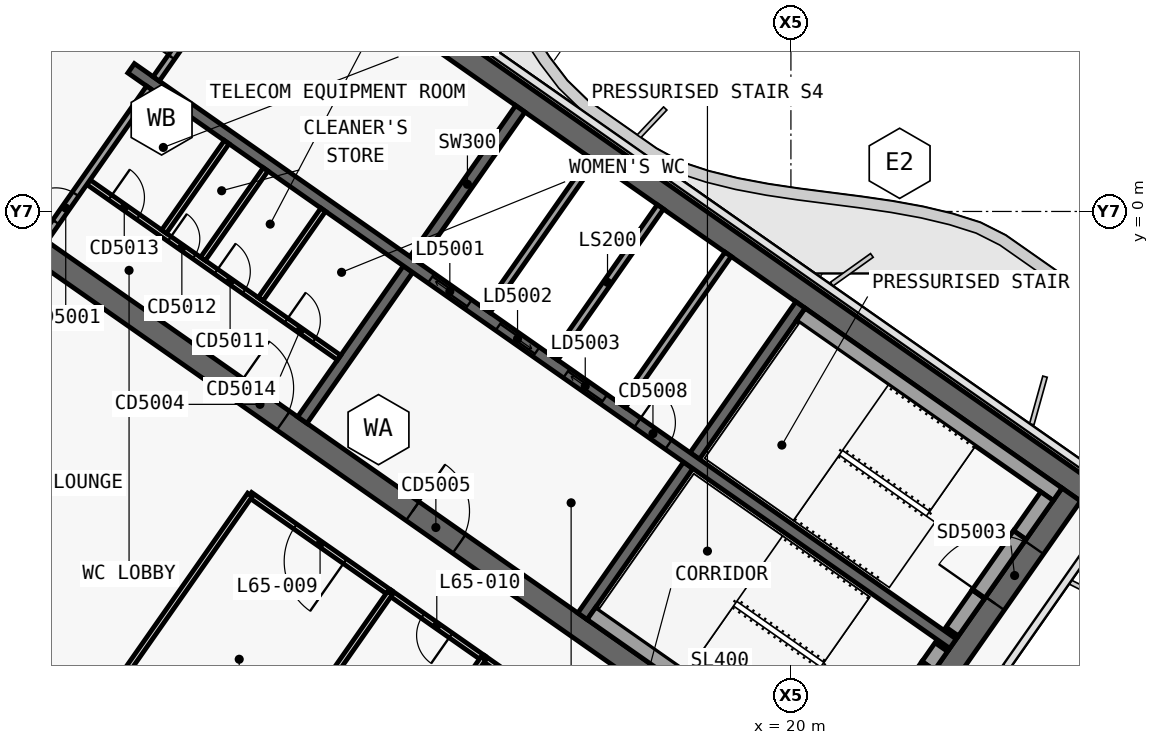
"""IFC4 building model, lengths in metres.
Left out: names, types, materials, properties, quantities, classifications, styles, units other than length and angle.
Written with IfcOpenShell. Run it as: python <this file> out.ifc"""

import sys

from ifc_helpers import new_model, si_unit, direction, frame, frame_2d, origin, place, context, subcontext, project, spatial, polyline, rectangle, outline, extrude, element, fill, save


model = new_model("IFC4")
c1 = context("Model", 3, precision=1e-05, world=origin(), true_north=direction((0.0, 1.0)))
c2 = subcontext(c1, "Body", "Model", "MODEL_VIEW")
j1 = project(units=[si_unit("LENGTHUNIT", "METRE"), si_unit("PLANEANGLEUNIT", "RADIAN")], contexts=[c1])
p1 = place(None, origin())
s1 = spatial("IfcSite", under=j1, at=p1, CompositionType="ELEMENT")
p2 = place(p1, origin())
s2 = spatial("IfcBuilding", under=s1, at=p2, CompositionType="ELEMENT")
p3 = place(p2, frame((0.0, 0.0, 276.1)))
s3 = spatial("IfcBuildingStorey", under=s2, at=p3, CompositionType="ELEMENT", Elevation=276.1)
p4 = place(p3, frame((0.028, 12.066, 0.0), z_axis=(0.0, 0.0, 1.0), x_axis=(0.819151382952, -0.573577380837, 0.0)))
e1 = element("IfcWall", 1, at=p4, inside=s3, PredefinedType="SHEAR", context=c2, shape_type="SweptSolid", body=[
    extrude(outline(polyline([(33.898, 0.3), (0.0, 0.3), (0.42, -0.3), (33.898, -0.3), (33.898, 0.3)])), origin(), (0.0, 0.0, 1.0), 3.9),
])
p5 = place(p3, frame((0.028, -0.874, 0.0), z_axis=(0.0, 0.0, 1.0), x_axis=(0.819150035022, -0.573579305871, 0.0)))
e2 = element("IfcWall", 2, at=p5, inside=s3, PredefinedType="SHEAR", context=c2, shape_type="SweptSolid", body=[
    extrude(outline(polyline([(26.476, 0.3), (0.0, 0.3), (0.42, -0.3), (26.476, -0.3), (26.476, 0.3)])), origin(), (0.0, 0.0, 1.0), 3.9),
])
p6 = place(p5, frame((6.576, 0.0, 0.0)))
e3 = element("IfcOpeningElement", 3, at=p6, cuts=e2, PredefinedType="OPENING", context=c2, shape_type="SweptSolid", body=[
    extrude(rectangle(XDim=1.5, YDim=2.1, at=frame_2d((0.75, 1.05))), frame((0.0, 0.31, 0.0), z_axis=(0.0, -1.0, 0.0), x_axis=(1.0, 0.0, 0.0)), (0.0, 0.0, 1.0), 0.62),
])
p7 = place(p5, frame((12.226, 0.0, 0.0)))
e4 = element("IfcOpeningElement", 4, at=p7, cuts=e2, PredefinedType="OPENING", context=c2, shape_type="SweptSolid", body=[
    extrude(rectangle(XDim=1.5, YDim=2.1, at=frame_2d((0.75, 1.05))), frame((0.0, 0.31, 0.0), z_axis=(0.0, -1.0, 0.0), x_axis=(1.0, 0.0, 0.0)), (0.0, 0.0, 1.0), 0.62),
])
p8 = place(p3, frame((21.642, -15.642, 0.0), z_axis=(0.0, 0.0, 1.0), x_axis=(0.573586866468, 0.819144740944, 0.0)))
e5 = element("IfcWall", 5, at=p8, inside=s3, PredefinedType="SHEAR", context=c2, shape_type="SweptSolid", body=[
    extrude(outline(polyline([(10.0, 0.3), (0.0, 0.3), (0.0, -0.3), (10.0, -0.3), (10.0, 0.3)])), origin(), (0.0, 0.0, 1.0), 3.9),
])
p9 = place(p8, frame((6.5, 0.0, 0.0)))
e6 = element("IfcOpeningElement", 6, at=p9, cuts=e5, PredefinedType="OPENING", context=c2, shape_type="SweptSolid", body=[
    extrude(rectangle(XDim=1.8, YDim=2.1, at=frame_2d((0.9, 1.05))), frame((0.0, 0.31, 0.0), z_axis=(0.0, -1.0, 0.0), x_axis=(1.0, 0.0, 0.0)), (0.0, 0.0, 1.0), 0.62),
])
p10 = place(p8, frame((2.3, 0.0, 0.0)))
e7 = element("IfcOpeningElement", 7, at=p10, cuts=e5, PredefinedType="OPENING", context=c2, shape_type="SweptSolid", body=[
    extrude(rectangle(XDim=1.8, YDim=2.1, at=frame_2d((0.9, 1.05))), frame((0.0, 0.31, 0.0), z_axis=(0.0, -1.0, 0.0), x_axis=(1.0, 0.0, 0.0)), (0.0, 0.0, 1.0), 0.62),
])
p11 = place(p3, frame((7.143, -5.49, 0.0), z_axis=(0.0, 0.0, 1.0), x_axis=(0.573617744349, 0.819123118565, 0.0)))
e8 = element("IfcWall", 8, at=p11, inside=s3, PredefinedType="SHEAR", context=c2, shape_type="SweptSolid", body=[
    extrude(outline(polyline([(0.0, 0.15), (0.0, -0.15), (4.85, -0.15), (4.85, 0.15), (0.0, 0.15)])), origin(), (0.0, 0.0, 1.0), 3.9),
])
p12 = place(p3, frame((10.097, -1.271, 0.0), z_axis=(0.0, 0.0, 1.0), x_axis=(0.573560315113, 0.819163332265, 0.0)))
e9 = element("IfcWall", 9, at=p12, inside=s3, PredefinedType="SHEAR", context=c2, shape_type="SweptSolid", body=[
    extrude(outline(polyline([(4.85, -0.15), (4.85, 0.15), (0.0, 0.15), (0.0, -0.15), (4.85, -0.15)])), origin(), (0.0, 0.0, 1.0), 3.9),
])
p13 = place(p3, frame((14.515, -10.652, 0.0), z_axis=(0.0, 0.0, 1.0), x_axis=(0.573560315113, 0.819163332265, 0.0)))
e10 = element("IfcWall", 10, at=p13, inside=s3, PredefinedType="SHEAR", context=c2, shape_type="SweptSolid", body=[
    extrude(outline(polyline([(0.0, 0.15), (0.0, -0.15), (4.85, -0.15), (4.85, 0.15), (0.0, 0.15)])), origin(), (0.0, 0.0, 1.0), 3.9),
])
p14 = place(p3, frame((17.469, -6.433, 0.0), z_axis=(0.0, 0.0, 1.0), x_axis=(0.573594092424, 0.81913968109, 0.0)))
e11 = element("IfcWall", 11, at=p14, inside=s3, PredefinedType="SHEAR", context=c2, shape_type="SweptSolid", body=[
    extrude(outline(polyline([(4.85, -0.15), (4.85, 0.15), (0.0, 0.15), (0.0, -0.15), (4.85, -0.15)])), origin(), (0.0, 0.0, 1.0), 3.9),
])
p15 = place(p3, frame((2.638, 3.768, 0.0), z_axis=(0.0, 0.0, 1.0), x_axis=(0.819155014212, -0.573572194837, 0.0)))
e12 = element("IfcWall", 12, at=p15, inside=s3, PredefinedType="SHEAR", context=c2, shape_type="SweptSolid", body=[
    extrude(outline(polyline([(0.0, 0.15), (0.0, -0.15), (26.4, -0.15), (26.4, 0.15), (0.0, 0.15)])), origin(), (0.0, 0.0, 1.0), 3.9),
])
p16 = place(p15, frame((9.637, 0.0, 0.0)))
e13 = element("IfcOpeningElement", 13, at=p16, cuts=e12, PredefinedType="OPENING", context=c2, shape_type="SweptSolid", body=[
    extrude(rectangle(XDim=1.2, YDim=2.1, at=frame_2d((0.6, 1.05))), frame((0.0, 0.16, 0.0), z_axis=(0.0, -1.0, 0.0), x_axis=(1.0, 0.0, 0.0)), (0.0, 0.0, 1.0), 0.32),
])
p17 = place(p15, frame((11.812, 0.0, 0.0)))
e14 = element("IfcOpeningElement", 14, at=p17, cuts=e12, PredefinedType="OPENING", context=c2, shape_type="SweptSolid", body=[
    extrude(rectangle(XDim=1.2, YDim=2.1, at=frame_2d((0.6, 1.05))), frame((0.0, 0.16, 0.0), z_axis=(0.0, -1.0, 0.0), x_axis=(1.0, 0.0, 0.0)), (0.0, 0.0, 1.0), 0.32),
])
p18 = place(p15, frame((13.988, 0.0, 0.0)))
e15 = element("IfcOpeningElement", 15, at=p18, cuts=e12, PredefinedType="OPENING", context=c2, shape_type="SweptSolid", body=[
    extrude(rectangle(XDim=1.2, YDim=2.1, at=frame_2d((0.6, 1.05))), frame((0.0, 0.16, 0.0), z_axis=(0.0, -1.0, 0.0), x_axis=(1.0, 0.0, 0.0)), (0.0, 0.0, 1.0), 0.32),
])
p19 = place(p15, frame((16.262, 0.0, 0.0)))
e16 = element("IfcOpeningElement", 16, at=p19, cuts=e12, PredefinedType="OPENING", context=c2, shape_type="SweptSolid", body=[
    extrude(rectangle(XDim=1.0, YDim=2.1, at=frame_2d((0.5, 1.05))), frame((0.0, 0.16, 0.0), z_axis=(0.0, -1.0, 0.0), x_axis=(1.0, 0.0, 0.0)), (0.0, 0.0, 1.0), 0.32),
])
p20 = place(p3, frame((12.001, -2.605, 0.0), z_axis=(0.0, 0.0, 1.0), x_axis=(0.573560315113, 0.819163332265, 0.0)))
e17 = element("IfcWall", 17, at=p20, inside=s3, PredefinedType="SOLIDWALL", context=c2, shape_type="SweptSolid", body=[
    extrude(rectangle(XDim=4.85, YDim=0.2, at=frame_2d((2.425, 0.0))), origin(), (0.0, 0.0, 1.0), 3.9),
])
p21 = place(p3, frame((13.783, -3.852, 0.0), z_axis=(0.0, 0.0, 1.0), x_axis=(0.573594092424, 0.81913968109, 0.0)))
e18 = element("IfcWall", 18, at=p21, inside=s3, PredefinedType="SOLIDWALL", context=c2, shape_type="SweptSolid", body=[
    extrude(rectangle(XDim=4.85, YDim=0.2, at=frame_2d((2.425, 0.0))), origin(), (0.0, 0.0, 1.0), 3.9),
])
p22 = place(p3, frame((15.565, -5.1, 0.0), z_axis=(0.0, 0.0, 1.0), x_axis=(0.573560315113, 0.819163332265, 0.0)))
e19 = element("IfcWall", 19, at=p22, inside=s3, PredefinedType="SOLIDWALL", context=c2, shape_type="SweptSolid", body=[
    extrude(rectangle(XDim=4.85, YDim=0.2, at=frame_2d((2.425, 0.0))), origin(), (0.0, 0.0, 1.0), 3.9),
])
p23 = place(p3, frame((1.516, 0.77, 0.0), z_axis=(0.0, 0.0, 1.0), x_axis=(0.819146424436, -0.573584462249, 0.0)))
e20 = element("IfcWall", 20, at=p23, inside=s3, PredefinedType="PARTITIONING", context=c2, shape_type="SweptSolid", body=[
    extrude(rectangle(XDim=8.05, YDim=0.15, at=frame_2d((4.025, 0.0))), origin(), (0.0, 0.0, 1.0), 3.62),
])
p24 = place(p23, frame((0.7, 0.0, 0.0)))
e21 = element("IfcOpeningElement", 21, at=p24, cuts=e20, PredefinedType="OPENING", context=c2, shape_type="SweptSolid", body=[
    extrude(rectangle(XDim=0.9, YDim=2.1, at=frame_2d((0.45, 1.05))), frame((0.0, 0.085, 0.0), z_axis=(0.0, -1.0, 0.0), x_axis=(1.0, 0.0, 0.0)), (0.0, 0.0, 1.0), 0.17),
])
p25 = place(p23, frame((2.6, 0.0, 0.0)))
e22 = element("IfcOpeningElement", 22, at=p25, cuts=e20, PredefinedType="OPENING", context=c2, shape_type="SweptSolid", body=[
    extrude(rectangle(XDim=0.8, YDim=2.1, at=frame_2d((0.4, 1.05))), frame((0.0, 0.085, 0.0), z_axis=(0.0, -1.0, 0.0), x_axis=(1.0, 0.0, 0.0)), (0.0, 0.0, 1.0), 0.17),
])
p26 = place(p23, frame((4.1, 0.0, 0.0)))
e23 = element("IfcOpeningElement", 23, at=p26, cuts=e20, PredefinedType="OPENING", context=c2, shape_type="SweptSolid", body=[
    extrude(rectangle(XDim=0.9, YDim=2.1, at=frame_2d((0.45, 1.05))), frame((0.0, 0.085, 0.0), z_axis=(0.0, -1.0, 0.0), x_axis=(1.0, 0.0, 0.0)), (0.0, 0.0, 1.0), 0.17),
])
p27 = place(p23, frame((6.35, 0.0, 0.0)))
e24 = element("IfcOpeningElement", 24, at=p27, cuts=e20, PredefinedType="OPENING", context=c2, shape_type="SweptSolid", body=[
    extrude(rectangle(XDim=0.9, YDim=2.1, at=frame_2d((0.45, 1.05))), frame((0.0, 0.085, 0.0), z_axis=(0.0, -1.0, 0.0), x_axis=(1.0, 0.0, 0.0)), (0.0, 0.0, 1.0), 0.17),
])
p28 = place(p3, frame((3.504, -0.531, 0.0), z_axis=(0.0, 0.0, 1.0), x_axis=(0.573582013179, 0.819148139324, 0.0)))
e25 = element("IfcWall", 25, at=p28, inside=s3, PredefinedType="PARTITIONING", context=c2, shape_type="SweptSolid", body=[
    extrude(rectangle(XDim=2.875, YDim=0.15, at=frame_2d((1.438, 0.0))), origin(), (0.0, 0.0, 1.0), 3.62),
])
p29 = place(p3, frame((4.528, -1.248, 0.0), z_axis=(0.0, 0.0, 1.0), x_axis=(0.573621911162, 0.819120200602, 0.0)))
e26 = element("IfcWall", 26, at=p29, inside=s3, PredefinedType="PARTITIONING", context=c2, shape_type="SweptSolid", body=[
    extrude(rectangle(XDim=2.875, YDim=0.15, at=frame_2d((1.438, 0.0))), origin(), (0.0, 0.0, 1.0), 3.62),
])
p30 = place(p3, frame((6.044, -2.309, 0.0), z_axis=(0.0, 0.0, 1.0), x_axis=(0.573564930514, 0.819160100642, 0.0)))
e27 = element("IfcWall", 27, at=p30, inside=s3, PredefinedType="PARTITIONING", context=c2, shape_type="SweptSolid", body=[
    extrude(rectangle(XDim=2.875, YDim=0.15, at=frame_2d((1.438, 0.0))), origin(), (0.0, 0.0, 1.0), 3.62),
])
p31 = place(p3, frame((20.259, -2.71, 0.0), z_axis=(0.0, 0.0, 1.0), x_axis=(0.81914849389, -0.573581506813, 0.0)))
e28 = element("IfcWall", 28, at=p31, inside=s3, PredefinedType="SOLIDWALL", context=c2, shape_type="SweptSolid", body=[
    extrude(rectangle(XDim=8.25, YDim=0.4, at=frame_2d((4.125, 0.0))), origin(), (0.0, 0.0, 1.0), 3.62),
])
p32 = place(p3, frame((24.244, -11.055, 0.0), z_axis=(0.0, 0.0, 1.0), x_axis=(0.573571582932, 0.819155442668, 0.0)))
e29 = element("IfcWall", 29, at=p32, inside=s3, PredefinedType="SOLIDWALL", context=c2, shape_type="SweptSolid", body=[
    extrude(rectangle(XDim=1.2, YDim=0.4, at=frame_2d((0.6, 0.0))), origin(), (0.0, 0.0, 1.0), 3.62),
])
p33 = place(p3, frame((26.022, -8.515, 0.0), z_axis=(0.0, 0.0, 1.0), x_axis=(0.573619628835, 0.819121798889, 0.0)))
e30 = element("IfcWall", 30, at=p33, inside=s3, PredefinedType="SOLIDWALL", context=c2, shape_type="SweptSolid", body=[
    extrude(rectangle(XDim=1.25, YDim=0.4, at=frame_2d((0.625, 0.0))), origin(), (0.0, 0.0, 1.0), 3.62),
])
p34 = place(p3, frame((24.932, -10.072, 2.15), z_axis=(0.0, 0.0, 1.0), x_axis=(0.573591692345, 0.819141361715, 0.0)))
e31 = element("IfcWall", 31, at=p34, inside=s3, PredefinedType="SOLIDWALL", context=c2, shape_type="SweptSolid", body=[
    extrude(rectangle(XDim=1.9, YDim=0.4, at=frame_2d((0.95, 0.0))), origin(), (0.0, 0.0, 1.0), 1.47),
])
p35 = place(p3, frame((14.753, -10.574, 0.0), z_axis=(0.0, 0.0, 1.0), x_axis=(0.819158229677, -0.573567602601, 0.0)))
e32 = element("IfcWall", 32, at=p35, inside=s3, PredefinedType="SOLIDWALL", context=c2, shape_type="SweptSolid", body=[
    extrude(rectangle(XDim=8.25, YDim=0.4, at=frame_2d((4.125, 0.0))), origin(), (0.0, 0.0, 1.0), 3.62),
])
p36 = place(p3, frame((23.613, -11.956, 0.0), z_axis=(0.0, 0.0, 1.0), x_axis=(0.573435029941, 0.819251039936, 0.0)))
e33 = element("IfcWall", 33, at=p36, inside=s3, PredefinedType="SOLIDWALL", context=c2, shape_type="SweptSolid", body=[
    extrude(rectangle(XDim=0.6, YDim=0.4, at=frame_2d((0.3, 0.0))), origin(), (0.0, 0.0, 1.0), 3.62),
])
p37 = place(p3, frame((22.523, -13.512, 2.15), z_axis=(0.0, 0.0, 1.0), x_axis=(0.573591692345, 0.819141361715, 0.0)))
e34 = element("IfcWall", 34, at=p37, inside=s3, PredefinedType="SOLIDWALL", context=c2, shape_type="SweptSolid", body=[
    extrude(rectangle(XDim=1.9, YDim=0.4, at=frame_2d((0.95, 0.0))), origin(), (0.0, 0.0, 1.0), 1.47),
])
p38 = place(p3, frame((0.344, -0.729, 0.0), z_axis=(0.0, 0.0, 1.0), x_axis=(0.573560315113, 0.819163332265, 0.0)))
e35 = element("IfcWall", 35, at=p38, inside=s3, PredefinedType="SOLIDWALL", context=c2, shape_type="SweptSolid", body=[
    extrude(rectangle(XDim=4.85, YDim=0.2, at=frame_2d((2.425, 0.0))), origin(), (0.0, 0.0, 1.0), 3.62),
])
p39 = place(p38, frame((0.55, 0.0, 0.0)))
e36 = element("IfcOpeningElement", 36, at=p39, cuts=e35, PredefinedType="OPENING", context=c2, shape_type="SweptSolid", body=[
    extrude(rectangle(XDim=0.9, YDim=2.1, at=frame_2d((0.45, 1.05))), frame((0.0, 0.11, 0.0), z_axis=(0.0, -1.0, 0.0), x_axis=(1.0, 0.0, 0.0)), (0.0, 0.0, 1.0), 0.22),
])
p40 = place(p3, frame((3.298, 3.49, 0.0), z_axis=(0.0, 0.0, 1.0), x_axis=(0.573560315113, 0.819163332265, 0.0)))
e37 = element("IfcWall", 37, at=p40, inside=s3, PredefinedType="SOLIDWALL", context=c2, shape_type="SweptSolid", body=[
    extrude(rectangle(XDim=4.85, YDim=0.2, at=frame_2d((2.425, 0.0))), origin(), (0.0, 0.0, 1.0), 3.62),
])
p41 = place(p40, frame((0.7, 0.0, 0.0)))
e38 = element("IfcOpeningElement", 38, at=p41, cuts=e37, PredefinedType="OPENING", context=c2, shape_type="SweptSolid", body=[
    extrude(rectangle(XDim=1.0, YDim=2.1, at=frame_2d((0.5, 1.05))), frame((0.0, 0.11, 0.0), z_axis=(0.0, -1.0, 0.0), x_axis=(1.0, 0.0, 0.0)), (0.0, 0.0, 1.0), 0.22),
])
p42 = place(p3, frame((9.454, -10.038, 0.0), z_axis=(0.0, 0.0, 1.0), x_axis=(-0.819142740634, 0.573589723117, 0.0)))
e39 = element("IfcWall", 39, at=p42, inside=s3, PredefinedType="PARTITIONING", context=c2, shape_type="SweptSolid", body=[
    extrude(rectangle(XDim=4.502, YDim=0.15, at=frame_2d((2.251, 0.0))), origin(), (0.0, 0.0, 1.0), 3.05),
])
p43 = place(p42, frame((1.451, 0.0, 0.0)))
e40 = element("IfcOpeningElement", 40, at=p43, cuts=e39, PredefinedType="OPENING", context=c2, shape_type="SweptSolid", body=[
    extrude(rectangle(XDim=1.6, YDim=2.1, at=frame_2d((0.8, 1.05))), frame((0.0, 0.085, 0.0), z_axis=(0.0, -1.0, 0.0), x_axis=(1.0, 0.0, 0.0)), (0.0, 0.0, 1.0), 0.17),
])
p44 = place(p3, frame((11.912, -11.759, 0.0), z_axis=(0.0, 0.0, 1.0), x_axis=(-0.81916700466, 0.573555070134, 0.0)))
e41 = element("IfcWall", 41, at=p44, inside=s3, PredefinedType="PARTITIONING", context=c2, shape_type="SweptSolid", body=[
    extrude(rectangle(XDim=3.004, YDim=0.15, at=frame_2d((1.502, 0.0))), origin(), (0.0, 0.0, 1.0), 3.62),
])
p45 = place(p44, frame((1.052, 0.0, 0.0)))
e42 = element("IfcOpeningElement", 42, at=p45, cuts=e41, PredefinedType="OPENING", context=c2, shape_type="SweptSolid", body=[
    extrude(rectangle(XDim=0.9, YDim=2.1, at=frame_2d((0.45, 1.05))), frame((0.0, 0.085, 0.0), z_axis=(0.0, -1.0, 0.0), x_axis=(1.0, 0.0, 0.0)), (0.0, 0.0, 1.0), 0.17),
])
p46 = place(p3, frame((14.369, -13.479, 0.0), z_axis=(0.0, 0.0, 1.0), x_axis=(-0.81916700466, 0.573555070134, 0.0)))
e43 = element("IfcWall", 43, at=p46, inside=s3, PredefinedType="PARTITIONING", context=c2, shape_type="SweptSolid", body=[
    extrude(rectangle(XDim=3.004, YDim=0.15, at=frame_2d((1.502, 0.0))), origin(), (0.0, 0.0, 1.0), 3.05),
])
p47 = place(p46, frame((1.052, 0.0, 0.0)))
e44 = element("IfcOpeningElement", 44, at=p47, cuts=e43, PredefinedType="OPENING", context=c2, shape_type="SweptSolid", body=[
    extrude(rectangle(XDim=0.9, YDim=2.1, at=frame_2d((0.45, 1.05))), frame((0.0, 0.085, 0.0), z_axis=(0.0, -1.0, 0.0), x_axis=(1.0, 0.0, 0.0)), (0.0, 0.0, 1.0), 0.17),
])
p48 = place(p3, frame((9.452, -10.037, 0.0), z_axis=(0.0, 0.0, 1.0), x_axis=(-0.573575945067, -0.81915238829, 0.0)))
e45 = element("IfcWall", 45, at=p48, inside=s3, PredefinedType="PARTITIONING", context=c2, shape_type="SweptSolid", body=[
    extrude(rectangle(XDim=7.5, YDim=0.15, at=frame_2d((3.75, 0.0))), origin(), (0.0, 0.0, 1.0), 3.0),
])
p49 = place(p3, frame((1.849, -13.051, 0.0), z_axis=(0.0, 0.0, 1.0), x_axis=(0.573577493031, 0.819151304393, 0.0)))
e46 = element("IfcWall", 46, at=p49, inside=s3, PredefinedType="PARTITIONING", context=c2, shape_type="SweptSolid", body=[
    extrude(rectangle(XDim=6.83, YDim=0.15, at=frame_2d((3.415, 0.0))), origin(), (0.0, 0.0, 1.0), 3.05),
])
p50 = place(p3, frame((11.91, -11.758, 0.0), z_axis=(0.0, 0.0, 1.0), x_axis=(-0.573560650686, -0.819163097304, 0.0)))
e47 = element("IfcWall", 47, at=p50, inside=s3, PredefinedType="PARTITIONING", context=c2, shape_type="SweptSolid", body=[
    extrude(rectangle(XDim=7.5, YDim=0.15, at=frame_2d((3.75, 0.0))), origin(), (0.0, 0.0, 1.0), 3.0),
])
p51 = place(p16, origin())
e48 = element("IfcDoor", 48, at=p51, inside=s3, OperationType="SLIDING_TO_LEFT", PredefinedType="DOOR", context=c2, shape_type="SweptSolid", body=[
    extrude(rectangle(XDim=1.2, YDim=2.1, at=frame_2d((0.6, 1.05))), frame((0.0, 0.025, 0.0), z_axis=(0.0, -1.0, 0.0), x_axis=(1.0, 0.0, 0.0)), (0.0, 0.0, 1.0), 0.05),
])
fill(e13, e48)
p52 = place(p17, origin())
e49 = element("IfcDoor", 49, at=p52, inside=s3, OperationType="SLIDING_TO_RIGHT", PredefinedType="DOOR", context=c2, shape_type="SweptSolid", body=[
    extrude(rectangle(XDim=1.2, YDim=2.1, at=frame_2d((0.6, 1.05))), frame((0.0, 0.025, 0.0), z_axis=(0.0, -1.0, 0.0), x_axis=(1.0, 0.0, 0.0)), (0.0, 0.0, 1.0), 0.05),
])
fill(e14, e49)
p53 = place(p18, origin())
e50 = element("IfcDoor", 50, at=p53, inside=s3, OperationType="SLIDING_TO_LEFT", PredefinedType="DOOR", context=c2, shape_type="SweptSolid", body=[
    extrude(rectangle(XDim=1.2, YDim=2.1, at=frame_2d((0.6, 1.05))), frame((0.0, 0.025, 0.0), z_axis=(0.0, -1.0, 0.0), x_axis=(1.0, 0.0, 0.0)), (0.0, 0.0, 1.0), 0.05),
])
fill(e15, e50)
p54 = place(p19, origin())
e51 = element("IfcDoor", 51, at=p54, inside=s3, OperationType="SINGLE_SWING_RIGHT", PredefinedType="DOOR", context=c2, shape_type="SweptSolid", body=[
    extrude(rectangle(XDim=1.0, YDim=2.1, at=frame_2d((0.5, 1.05))), frame((0.0, 0.025, 0.0), z_axis=(0.0, -1.0, 0.0), x_axis=(1.0, 0.0, 0.0)), (0.0, 0.0, 1.0), 0.05),
])
fill(e16, e51)
p55 = place(p24, origin())
e52 = element("IfcDoor", 52, at=p55, inside=s3, OperationType="SINGLE_SWING_RIGHT", PredefinedType="DOOR", context=c2, shape_type="SweptSolid", body=[
    extrude(rectangle(XDim=0.9, YDim=2.1, at=frame_2d((0.45, 1.05))), frame((0.0, 0.025, 0.0), z_axis=(0.0, -1.0, 0.0), x_axis=(1.0, 0.0, 0.0)), (0.0, 0.0, 1.0), 0.05),
])
fill(e21, e52)
p56 = place(p25, origin())
e53 = element("IfcDoor", 53, at=p56, inside=s3, OperationType="SINGLE_SWING_RIGHT", PredefinedType="DOOR", context=c2, shape_type="SweptSolid", body=[
    extrude(rectangle(XDim=0.8, YDim=2.1, at=frame_2d((0.4, 1.05))), frame((0.0, 0.025, 0.0), z_axis=(0.0, -1.0, 0.0), x_axis=(1.0, 0.0, 0.0)), (0.0, 0.0, 1.0), 0.05),
])
fill(e22, e53)
p57 = place(p26, origin())
e54 = element("IfcDoor", 54, at=p57, inside=s3, OperationType="SINGLE_SWING_RIGHT", PredefinedType="DOOR", context=c2, shape_type="SweptSolid", body=[
    extrude(rectangle(XDim=0.9, YDim=2.1, at=frame_2d((0.45, 1.05))), frame((0.0, 0.025, 0.0), z_axis=(0.0, -1.0, 0.0), x_axis=(1.0, 0.0, 0.0)), (0.0, 0.0, 1.0), 0.05),
])
fill(e23, e54)
p58 = place(p27, origin())
e55 = element("IfcDoor", 55, at=p58, inside=s3, OperationType="SINGLE_SWING_RIGHT", PredefinedType="DOOR", context=c2, shape_type="SweptSolid", body=[
    extrude(rectangle(XDim=0.9, YDim=2.1, at=frame_2d((0.45, 1.05))), frame((0.0, 0.025, 0.0), z_axis=(0.0, -1.0, 0.0), x_axis=(1.0, 0.0, 0.0)), (0.0, 0.0, 1.0), 0.05),
])
fill(e24, e55)
p59 = place(p6, origin())
e56 = element("IfcDoor", 56, at=p59, inside=s3, OperationType="SINGLE_SWING_RIGHT", PredefinedType="DOOR", context=c2, shape_type="SweptSolid", body=[
    extrude(rectangle(XDim=1.5, YDim=2.1, at=frame_2d((0.75, 1.05))), frame((0.0, 0.025, 0.0), z_axis=(0.0, -1.0, 0.0), x_axis=(1.0, 0.0, 0.0)), (0.0, 0.0, 1.0), 0.05),
])
fill(e3, e56)
p60 = place(p7, origin())
e57 = element("IfcDoor", 57, at=p60, inside=s3, OperationType="DOUBLE_DOOR_SINGLE_SWING", PredefinedType="DOOR", context=c2, shape_type="SweptSolid", body=[
    extrude(rectangle(XDim=1.5, YDim=2.1, at=frame_2d((0.75, 1.05))), frame((0.0, 0.025, 0.0), z_axis=(0.0, -1.0, 0.0), x_axis=(1.0, 0.0, 0.0)), (0.0, 0.0, 1.0), 0.05),
])
fill(e4, e57)
p61 = place(p9, origin())
e58 = element("IfcDoor", 58, at=p61, inside=s3, OperationType="DOUBLE_DOOR_SINGLE_SWING", PredefinedType="DOOR", context=c2, shape_type="SweptSolid", body=[
    extrude(rectangle(XDim=1.8, YDim=2.1, at=frame_2d((0.9, 1.05))), frame((0.0, 0.025, 0.0), z_axis=(0.0, -1.0, 0.0), x_axis=(1.0, 0.0, 0.0)), (0.0, 0.0, 1.0), 0.05),
])
fill(e6, e58)
p62 = place(p39, origin())
e59 = element("IfcDoor", 59, at=p62, inside=s3, OperationType="SINGLE_SWING_RIGHT", PredefinedType="DOOR", context=c2, shape_type="SweptSolid", body=[
    extrude(rectangle(XDim=0.9, YDim=2.1, at=frame_2d((0.45, 1.05))), frame((0.0, 0.025, 0.0), z_axis=(0.0, -1.0, 0.0), x_axis=(1.0, 0.0, 0.0)), (0.0, 0.0, 1.0), 0.05),
])
fill(e36, e59)
p63 = place(p41, origin())
e60 = element("IfcDoor", 60, at=p63, inside=s3, OperationType="SINGLE_SWING_RIGHT", PredefinedType="DOOR", context=c2, shape_type="SweptSolid", body=[
    extrude(rectangle(XDim=1.0, YDim=2.1, at=frame_2d((0.5, 1.05))), frame((0.0, 0.025, 0.0), z_axis=(0.0, -1.0, 0.0), x_axis=(1.0, 0.0, 0.0)), (0.0, 0.0, 1.0), 0.05),
])
fill(e38, e60)
p64 = place(p43, origin())
e61 = element("IfcDoor", 61, at=p64, inside=s3, OperationType="DOUBLE_DOOR_SINGLE_SWING", PredefinedType="DOOR", context=c2, shape_type="SweptSolid", body=[
    extrude(rectangle(XDim=1.6, YDim=2.1, at=frame_2d((0.8, 1.05))), frame((0.0, 0.025, 0.0), z_axis=(0.0, -1.0, 0.0), x_axis=(1.0, 0.0, 0.0)), (0.0, 0.0, 1.0), 0.05),
])
fill(e40, e61)
p65 = place(p45, origin())
e62 = element("IfcDoor", 62, at=p65, inside=s3, OperationType="SINGLE_SWING_LEFT", PredefinedType="DOOR", context=c2, shape_type="SweptSolid", body=[
    extrude(rectangle(XDim=0.9, YDim=2.1, at=frame_2d((0.45, 1.05))), frame((0.0, 0.025, 0.0), z_axis=(0.0, -1.0, 0.0), x_axis=(1.0, 0.0, 0.0)), (0.0, 0.0, 1.0), 0.05),
])
fill(e42, e62)
save(model, sys.argv[1])
